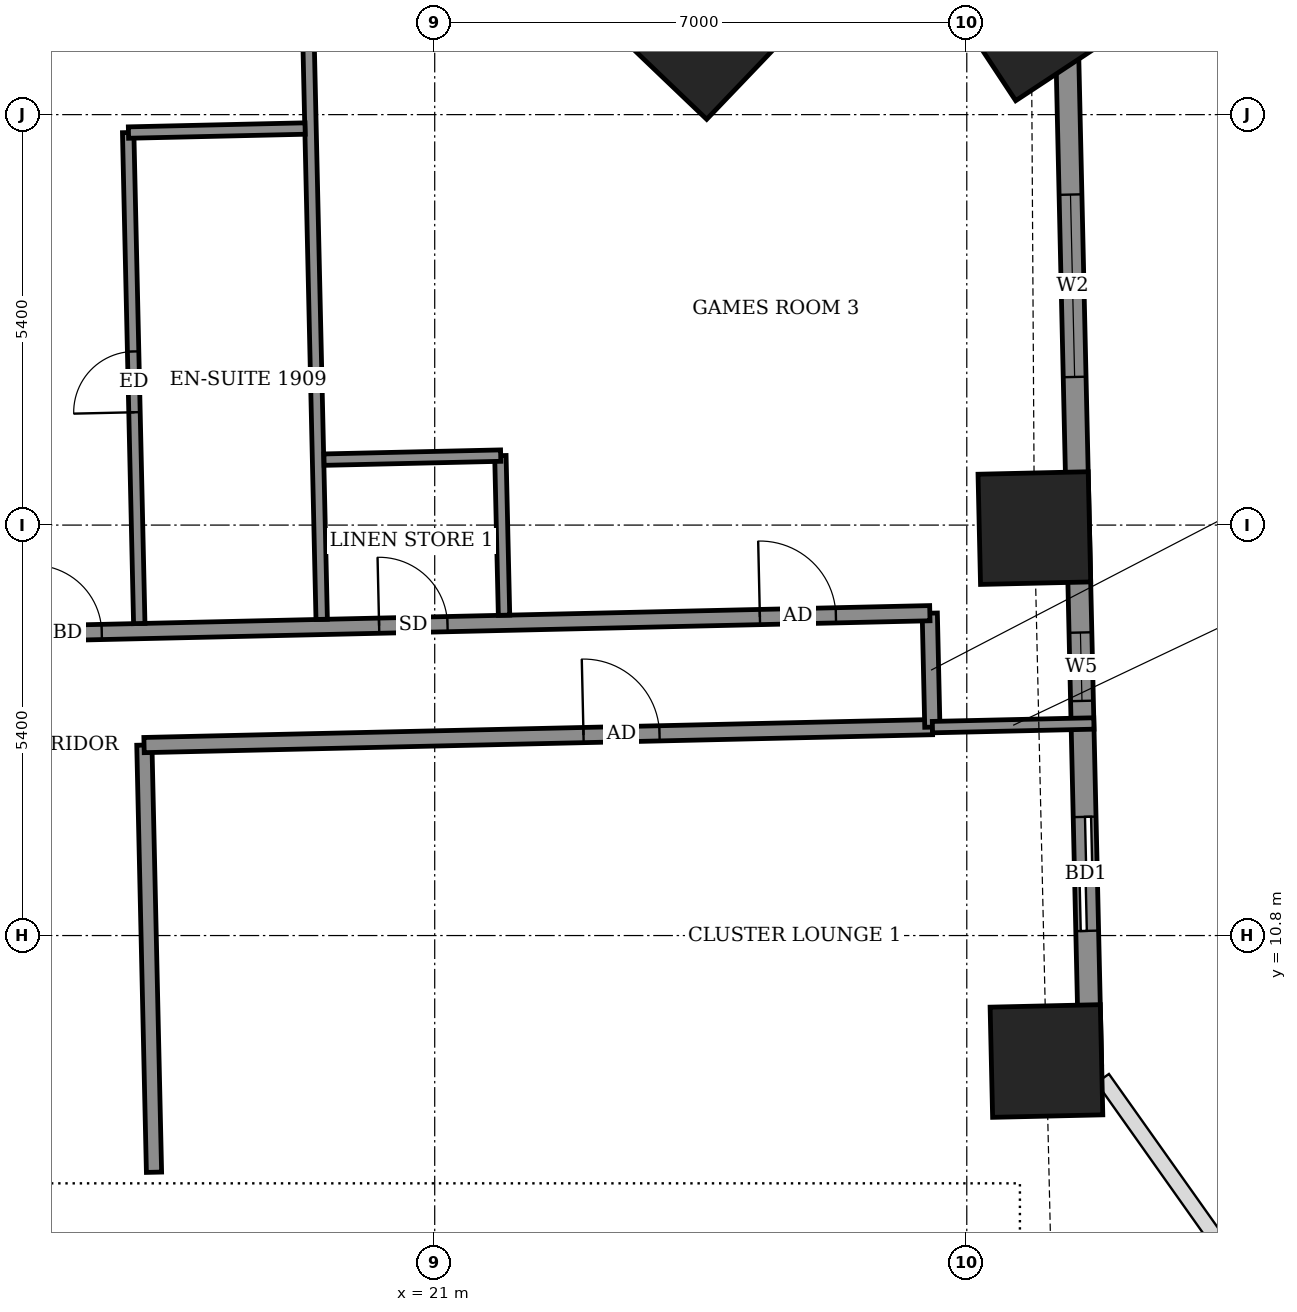
"""IFC4 building model, lengths in metres.
Left out: names, types, materials, properties, quantities, classifications, styles, units other than length and angle.
Written with IfcOpenShell. Run it as: python <this file> out.ifc"""

import sys

from ifc_helpers import new_model, si_unit, direction, frame, frame_2d, origin, origin_2d, place, context, subcontext, project, spatial, rectangle, extrude, element, fill, save


model = new_model("IFC4")
c1 = context("Model", 3, precision=1e-05, world=origin(), true_north=direction((0.0, 1.0)))
c2 = subcontext(c1, "Body", "Model", "MODEL_VIEW")
j1 = project(units=[si_unit("LENGTHUNIT", "METRE"), si_unit("PLANEANGLEUNIT", "RADIAN")], contexts=[c1])
p1 = place(None, origin())
s1 = spatial("IfcSite", under=j1, at=p1, CompositionType="ELEMENT")
p2 = place(p1, origin())
s2 = spatial("IfcBuilding", under=s1, at=p2, CompositionType="ELEMENT")
p3 = place(p2, frame((0.0, 0.0, 79.3)))
s3 = spatial("IfcBuildingStorey", under=s2, at=p3, CompositionType="ELEMENT", Elevation=79.3)
for number, where, z_axis, x_axis in (
    (1, (29.048, 9.15, -0.55), (0.0, 0.0, 1.0), (-0.023, 1.0, 0.0)),
    (2, (28.889, 16.161, -0.55), (0.0, 0.0, 1.0), (-0.023, 1.0, 0.0)),
    (3, (28.85, 22.788, -0.55), (0.0, 0.0, 1.0), (-0.551, 0.835, 0.0)),
    (4, (24.555, 22.564, -0.55), (0.0, 0.0, 1.0), (-0.723, 0.691, 0.0)),
):
    element("IfcColumn", number, at=place(p3, frame(where, z_axis=z_axis, x_axis=x_axis)), inside=s3, PredefinedType="COLUMN", context=c2, shape_type="SweptSolid", body=[
        extrude(rectangle(XDim=1.45, YDim=1.45, at=origin_2d()), origin(), (0.0, 0.0, 1.0), 3.6),
    ])
p4 = place(p3, frame((29.624, 9.108, 0.0), z_axis=(0.0, 0.0, 1.0), x_axis=(-0.022679601751, 0.999742784752, 0.0)))
e5 = element("IfcWall", 5, at=p4, inside=s3, PredefinedType="SOLIDWALL", context=c2, shape_type="SweptSolid", body=[
    extrude(rectangle(XDim=13.93, YDim=0.3, at=frame_2d((6.965, 0.0))), origin(), (0.0, 0.0, 1.0), 3.05),
])
p5 = place(p4, frame((1.754, 0.0, 0.0)))
e6 = element("IfcOpeningElement", 6, at=p5, cuts=e5, PredefinedType="OPENING", context=c2, shape_type="SweptSolid", body=[
    extrude(rectangle(XDim=1.5, YDim=2.4, at=frame_2d((0.75, 1.2))), frame((0.0, 0.16, 0.0), z_axis=(0.0, -1.0, 0.0), x_axis=(1.0, 0.0, 0.0)), (0.0, 0.0, 1.0), 0.32),
])
p6 = place(p4, frame((4.78, 0.0, 0.9)))
e7 = element("IfcOpeningElement", 7, at=p6, cuts=e5, PredefinedType="OPENING", context=c2, shape_type="SweptSolid", body=[
    extrude(rectangle(XDim=0.9, YDim=1.5, at=frame_2d((0.45, 0.75))), frame((0.0, 0.16, 0.0), z_axis=(0.0, -1.0, 0.0), x_axis=(1.0, 0.0, 0.0)), (0.0, 0.0, 1.0), 0.32),
])
p7 = place(p4, frame((9.043, 0.0, 0.9)))
e8 = element("IfcOpeningElement", 8, at=p7, cuts=e5, PredefinedType="OPENING", context=c2, shape_type="SweptSolid", body=[
    extrude(rectangle(XDim=2.4, YDim=1.5, at=frame_2d((1.2, 0.75))), frame((0.0, 0.16, 0.0), z_axis=(0.0, -1.0, 0.0), x_axis=(1.0, 0.0, 0.0)), (0.0, 0.0, 1.0), 0.32),
])
p8 = place(p3, frame((17.307, 7.686, 0.0), z_axis=(0.0, 0.0, 1.0), x_axis=(-0.022584272568, 0.999744942789, 0.0)))
e9 = element("IfcWall", 9, at=p8, inside=s3, PredefinedType="PARTITIONING", context=c2, shape_type="SweptSolid", body=[
    extrude(rectangle(XDim=5.621, YDim=0.2, at=frame_2d((2.811, 0.0))), origin(), (0.0, 0.0, 1.0), 3.05),
])
p9 = place(p3, frame((17.176, 13.306, 0.0), z_axis=(0.0, 0.0, 1.0), x_axis=(0.999741057438, 0.022755616292, 0.0)))
e10 = element("IfcWall", 10, at=p9, inside=s3, PredefinedType="PARTITIONING", context=c2, shape_type="SweptSolid", body=[
    extrude(rectangle(XDim=10.375, YDim=0.2, at=frame_2d((5.188, 0.0))), origin(), (0.0, 0.0, 1.0), 3.05),
])
p10 = place(p9, frame((5.783, 0.0, 0.0)))
e11 = element("IfcOpeningElement", 11, at=p10, cuts=e10, PredefinedType="OPENING", context=c2, shape_type="SweptSolid", body=[
    extrude(rectangle(XDim=1.0, YDim=2.1, at=frame_2d((0.5, 1.05))), frame((0.0, 0.11, 0.0), z_axis=(0.0, -1.0, 0.0), x_axis=(1.0, 0.0, 0.0)), (0.0, 0.0, 1.0), 0.22),
])
p11 = place(p3, frame((27.547, 13.542, 0.0), z_axis=(0.0, 0.0, 1.0), x_axis=(-0.02279537805, 0.999740151609, 0.0)))
e12 = element("IfcWall", 12, at=p11, inside=s3, PredefinedType="PARTITIONING", context=c2, shape_type="SweptSolid", body=[
    extrude(rectangle(XDim=1.5, YDim=0.2, at=frame_2d((0.75, 0.0))), origin(), (0.0, 0.0, 1.0), 3.05),
])
p12 = place(p3, frame((27.548, 13.542, 0.0), z_axis=(0.0, 0.0, 1.0), x_axis=(0.999743730464, 0.022637875276, 0.0)))
e13 = element("IfcWall", 13, at=p12, inside=s3, PredefinedType="PARTITIONING", context=c2, shape_type="SweptSolid", body=[
    extrude(rectangle(XDim=2.125, YDim=0.15, at=frame_2d((1.062, 0.0))), origin(), (0.0, 0.0, 1.0), 2.55),
])
p13 = place(p3, frame((-24.895, 13.852, 0.0), z_axis=(0.0, 0.0, 1.0), x_axis=(0.999742765181, 0.02268046447, 0.0)))
e14 = element("IfcWall", 14, at=p13, inside=s3, PredefinedType="PARTITIONING", context=c2, shape_type="SweptSolid", body=[
    extrude(rectangle(XDim=52.422, YDim=0.2, at=frame_2d((26.211, 0.0))), origin(), (0.0, 0.0, 1.0), 3.05),
])
p14 = place(p13, frame((50.186, 0.0, 0.0)))
e15 = element("IfcOpeningElement", 15, at=p14, cuts=e14, PredefinedType="OPENING", context=c2, shape_type="SweptSolid", body=[
    extrude(rectangle(XDim=1.0, YDim=2.1, at=frame_2d((0.5, 1.05))), frame((0.0, 0.11, 0.0), z_axis=(0.0, -1.0, 0.0), x_axis=(1.0, 0.0, 0.0)), (0.0, 0.0, 1.0), 0.22),
])
p15 = place(p13, frame((45.175, 0.0, 0.0)))
e16 = element("IfcOpeningElement", 16, at=p15, cuts=e14, PredefinedType="OPENING", context=c2, shape_type="SweptSolid", body=[
    extrude(rectangle(XDim=0.9, YDim=2.1, at=frame_2d((0.45, 1.05))), frame((0.0, 0.11, 0.0), z_axis=(0.0, -1.0, 0.0), x_axis=(1.0, 0.0, 0.0)), (0.0, 0.0, 1.0), 0.22),
])
p16 = place(p13, frame((40.625, 0.0, 0.0)))
e17 = element("IfcOpeningElement", 17, at=p16, cuts=e14, PredefinedType="OPENING", context=c2, shape_type="SweptSolid", body=[
    extrude(rectangle(XDim=0.9, YDim=2.1, at=frame_2d((0.45, 1.05))), frame((0.0, 0.11, 0.0), z_axis=(0.0, -1.0, 0.0), x_axis=(1.0, 0.0, 0.0)), (0.0, 0.0, 1.0), 0.22),
])
p17 = place(p13, frame((38.65, 0.0, 0.0)))
e18 = element("IfcOpeningElement", 18, at=p17, cuts=e14, PredefinedType="OPENING", context=c2, shape_type="SweptSolid", body=[
    extrude(rectangle(XDim=0.9, YDim=2.1, at=frame_2d((0.45, 1.05))), frame((0.0, 0.11, 0.0), z_axis=(0.0, -1.0, 0.0), x_axis=(1.0, 0.0, 0.0)), (0.0, 0.0, 1.0), 0.22),
])
p18 = place(p13, frame((31.725, 0.0, 0.0)))
e19 = element("IfcOpeningElement", 19, at=p18, cuts=e14, PredefinedType="OPENING", context=c2, shape_type="SweptSolid", body=[
    extrude(rectangle(XDim=0.9, YDim=2.1, at=frame_2d((0.45, 1.05))), frame((0.0, 0.11, 0.0), z_axis=(0.0, -1.0, 0.0), x_axis=(1.0, 0.0, 0.0)), (0.0, 0.0, 1.0), 0.22),
])
p19 = place(p13, frame((29.575, 0.0, 0.0)))
e20 = element("IfcOpeningElement", 20, at=p19, cuts=e14, PredefinedType="OPENING", context=c2, shape_type="SweptSolid", body=[
    extrude(rectangle(XDim=0.9, YDim=2.1, at=frame_2d((0.45, 1.05))), frame((0.0, 0.11, 0.0), z_axis=(0.0, -1.0, 0.0), x_axis=(1.0, 0.0, 0.0)), (0.0, 0.0, 1.0), 0.22),
])
p20 = place(p13, frame((22.75, 0.0, 0.0)))
e21 = element("IfcOpeningElement", 21, at=p20, cuts=e14, PredefinedType="OPENING", context=c2, shape_type="SweptSolid", body=[
    extrude(rectangle(XDim=0.9, YDim=2.1, at=frame_2d((0.45, 1.05))), frame((0.0, 0.11, 0.0), z_axis=(0.0, -1.0, 0.0), x_axis=(1.0, 0.0, 0.0)), (0.0, 0.0, 1.0), 0.22),
])
p21 = place(p13, frame((20.75, 0.0, 0.0)))
e22 = element("IfcOpeningElement", 22, at=p21, cuts=e14, PredefinedType="OPENING", context=c2, shape_type="SweptSolid", body=[
    extrude(rectangle(XDim=0.9, YDim=2.1, at=frame_2d((0.45, 1.05))), frame((0.0, 0.11, 0.0), z_axis=(0.0, -1.0, 0.0), x_axis=(1.0, 0.0, 0.0)), (0.0, 0.0, 1.0), 0.22),
])
p22 = place(p13, frame((13.95, 0.0, 0.0)))
e23 = element("IfcOpeningElement", 23, at=p22, cuts=e14, PredefinedType="OPENING", context=c2, shape_type="SweptSolid", body=[
    extrude(rectangle(XDim=0.9, YDim=2.1, at=frame_2d((0.45, 1.05))), frame((0.0, 0.11, 0.0), z_axis=(0.0, -1.0, 0.0), x_axis=(1.0, 0.0, 0.0)), (0.0, 0.0, 1.0), 0.22),
])
p23 = place(p13, frame((11.85, 0.0, 0.0)))
e24 = element("IfcOpeningElement", 24, at=p23, cuts=e14, PredefinedType="OPENING", context=c2, shape_type="SweptSolid", body=[
    extrude(rectangle(XDim=0.9, YDim=2.1, at=frame_2d((0.45, 1.05))), frame((0.0, 0.11, 0.0), z_axis=(0.0, -1.0, 0.0), x_axis=(1.0, 0.0, 0.0)), (0.0, 0.0, 1.0), 0.22),
])
p24 = place(p13, frame((1.425, 0.0, 0.0)))
e25 = element("IfcOpeningElement", 25, at=p24, cuts=e14, PredefinedType="OPENING", context=c2, shape_type="SweptSolid", body=[
    extrude(rectangle(XDim=1.0, YDim=2.1, at=frame_2d((0.5, 1.05))), frame((0.0, 0.11, 0.0), z_axis=(0.0, -1.0, 0.0), x_axis=(1.0, 0.0, 0.0)), (0.0, 0.0, 1.0), 0.22),
])
p25 = place(p13, frame((6.925, 0.0, 0.0)))
e26 = element("IfcOpeningElement", 26, at=p25, cuts=e14, PredefinedType="OPENING", context=c2, shape_type="SweptSolid", body=[
    extrude(rectangle(XDim=0.9, YDim=2.1, at=frame_2d((0.45, 1.05))), frame((0.0, 0.11, 0.0), z_axis=(0.0, -1.0, 0.0), x_axis=(1.0, 0.0, 0.0)), (0.0, 0.0, 1.0), 0.22),
])
p26 = place(p3, frame((17.113, 14.905, 0.0), z_axis=(0.0, 0.0, 1.0), x_axis=(-0.022597796078, 0.999744637201, 0.0)))
e27 = element("IfcWall", 27, at=p26, inside=s3, PredefinedType="PARTITIONING", context=c2, shape_type="SweptSolid", body=[
    extrude(rectangle(XDim=6.461, YDim=0.15, at=frame_2d((3.23, 0.0))), origin(), (0.0, 0.0, 1.0), 3.05),
])
p27 = place(p26, frame((2.78, 0.0, 0.0)))
e28 = element("IfcOpeningElement", 28, at=p27, cuts=e27, PredefinedType="OPENING", context=c2, shape_type="SweptSolid", body=[
    extrude(rectangle(XDim=0.8, YDim=2.1, at=frame_2d((0.4, 1.05))), frame((0.0, 0.085, 0.0), z_axis=(0.0, -1.0, 0.0), x_axis=(1.0, 0.0, 0.0)), (0.0, 0.0, 1.0), 0.17),
])
p28 = place(p3, frame((19.513, 14.96, 0.0), z_axis=(0.0, 0.0, 1.0), x_axis=(-0.022740189192, 0.999741408463, 0.0)))
e29 = element("IfcWall", 29, at=p28, inside=s3, PredefinedType="PARTITIONING", context=c2, shape_type="SweptSolid", body=[
    extrude(rectangle(XDim=12.4, YDim=0.15, at=frame_2d((6.2, 0.0))), origin(), (0.0, 0.0, 1.0), 2.55),
])
p29 = place(p3, frame((21.912, 15.014, 0.0), z_axis=(0.0, 0.0, 1.0), x_axis=(-0.022895647347, 0.999737860308, 0.0)))
e30 = element("IfcWall", 30, at=p29, inside=s3, PredefinedType="PARTITIONING", context=c2, shape_type="SweptSolid", body=[
    extrude(rectangle(XDim=2.101, YDim=0.15, at=frame_2d((1.05, 0.0))), origin(), (0.0, 0.0, 1.0), 3.05),
])
for number, where, z_axis, x_axis in (
    (31, (19.544, 17.061, 0.0), (0.0, 0.0, 1.0), (1.0, 0.023, 0.0)),
    (32, (16.971, 21.364, 0.0), (0.0, 0.0, 1.0), (1.0, 0.023, 0.0)),
):
    element("IfcWall", number, at=place(p3, frame(where, z_axis=z_axis, x_axis=x_axis)), inside=s3, PredefinedType="PARTITIONING", context=c2, shape_type="SweptSolid", body=[
        extrude(rectangle(XDim=2.324, YDim=0.15, at=frame_2d((1.162, 0.0))), origin(), (0.0, 0.0, 1.0), 3.05),
    ])
p30 = place(p5, origin())
e33 = element("IfcDoor", 33, at=p30, inside=s3, OperationType="SLIDING_TO_LEFT", PredefinedType="DOOR", context=c2, shape_type="SweptSolid", body=[
    extrude(rectangle(XDim=1.5, YDim=2.4, at=frame_2d((0.75, 1.2))), frame((0.0, 0.025, 0.0), z_axis=(0.0, -1.0, 0.0), x_axis=(1.0, 0.0, 0.0)), (0.0, 0.0, 1.0), 0.05),
])
fill(e6, e33)
p31 = place(p6, origin())
e34 = element("IfcWindow", 34, at=p31, inside=s3, PartitioningType="SINGLE_PANEL", PredefinedType="WINDOW", context=c2, shape_type="SweptSolid", body=[
    extrude(rectangle(XDim=0.9, YDim=1.5, at=frame_2d((0.45, 0.75))), frame((0.0, 0.03, 0.0), z_axis=(0.0, -1.0, 0.0), x_axis=(1.0, 0.0, 0.0)), (0.0, 0.0, 1.0), 0.06),
])
fill(e7, e34)
p32 = place(p7, origin())
e35 = element("IfcWindow", 35, at=p32, inside=s3, PartitioningType="DOUBLE_PANEL_VERTICAL", PredefinedType="WINDOW", context=c2, shape_type="SweptSolid", body=[
    extrude(rectangle(XDim=2.4, YDim=1.5, at=frame_2d((1.2, 0.75))), frame((0.0, 0.03, 0.0), z_axis=(0.0, -1.0, 0.0), x_axis=(1.0, 0.0, 0.0)), (0.0, 0.0, 1.0), 0.06),
])
fill(e8, e35)
p33 = place(p10, origin())
e36 = element("IfcDoor", 36, at=p33, inside=s3, OperationType="SINGLE_SWING_RIGHT", PredefinedType="DOOR", context=c2, shape_type="SweptSolid", body=[
    extrude(rectangle(XDim=1.0, YDim=2.1, at=frame_2d((0.5, 1.05))), frame((0.0, 0.025, 0.0), z_axis=(0.0, -1.0, 0.0), x_axis=(1.0, 0.0, 0.0)), (0.0, 0.0, 1.0), 0.05),
])
fill(e11, e36)
p34 = place(p14, origin())
e37 = element("IfcDoor", 37, at=p34, inside=s3, OperationType="SINGLE_SWING_LEFT", PredefinedType="DOOR", context=c2, shape_type="SweptSolid", body=[
    extrude(rectangle(XDim=1.0, YDim=2.1, at=frame_2d((0.5, 1.05))), frame((0.0, 0.025, 0.0), z_axis=(0.0, -1.0, 0.0), x_axis=(1.0, 0.0, 0.0)), (0.0, 0.0, 1.0), 0.05),
])
fill(e15, e37)
p35 = place(p15, origin())
e38 = element("IfcDoor", 38, at=p35, inside=s3, OperationType="SINGLE_SWING_LEFT", PredefinedType="DOOR", context=c2, shape_type="SweptSolid", body=[
    extrude(rectangle(XDim=0.9, YDim=2.1, at=frame_2d((0.45, 1.05))), frame((0.0, 0.025, 0.0), z_axis=(0.0, -1.0, 0.0), x_axis=(1.0, 0.0, 0.0)), (0.0, 0.0, 1.0), 0.05),
])
fill(e16, e38)
p36 = place(p16, origin())
e39 = element("IfcDoor", 39, at=p36, inside=s3, OperationType="SINGLE_SWING_LEFT", PredefinedType="DOOR", context=c2, shape_type="SweptSolid", body=[
    extrude(rectangle(XDim=0.9, YDim=2.1, at=frame_2d((0.45, 1.05))), frame((0.0, 0.025, 0.0), z_axis=(0.0, -1.0, 0.0), x_axis=(1.0, 0.0, 0.0)), (0.0, 0.0, 1.0), 0.05),
])
fill(e17, e39)
p37 = place(p27, origin())
e40 = element("IfcDoor", 40, at=p37, inside=s3, OperationType="SINGLE_SWING_LEFT", PredefinedType="DOOR", context=c2, shape_type="SweptSolid", body=[
    extrude(rectangle(XDim=0.8, YDim=2.1, at=frame_2d((0.4, 1.05))), frame((0.0, 0.025, 0.0), z_axis=(0.0, -1.0, 0.0), x_axis=(1.0, 0.0, 0.0)), (0.0, 0.0, 1.0), 0.05),
])
fill(e28, e40)
save(model, sys.argv[1])
